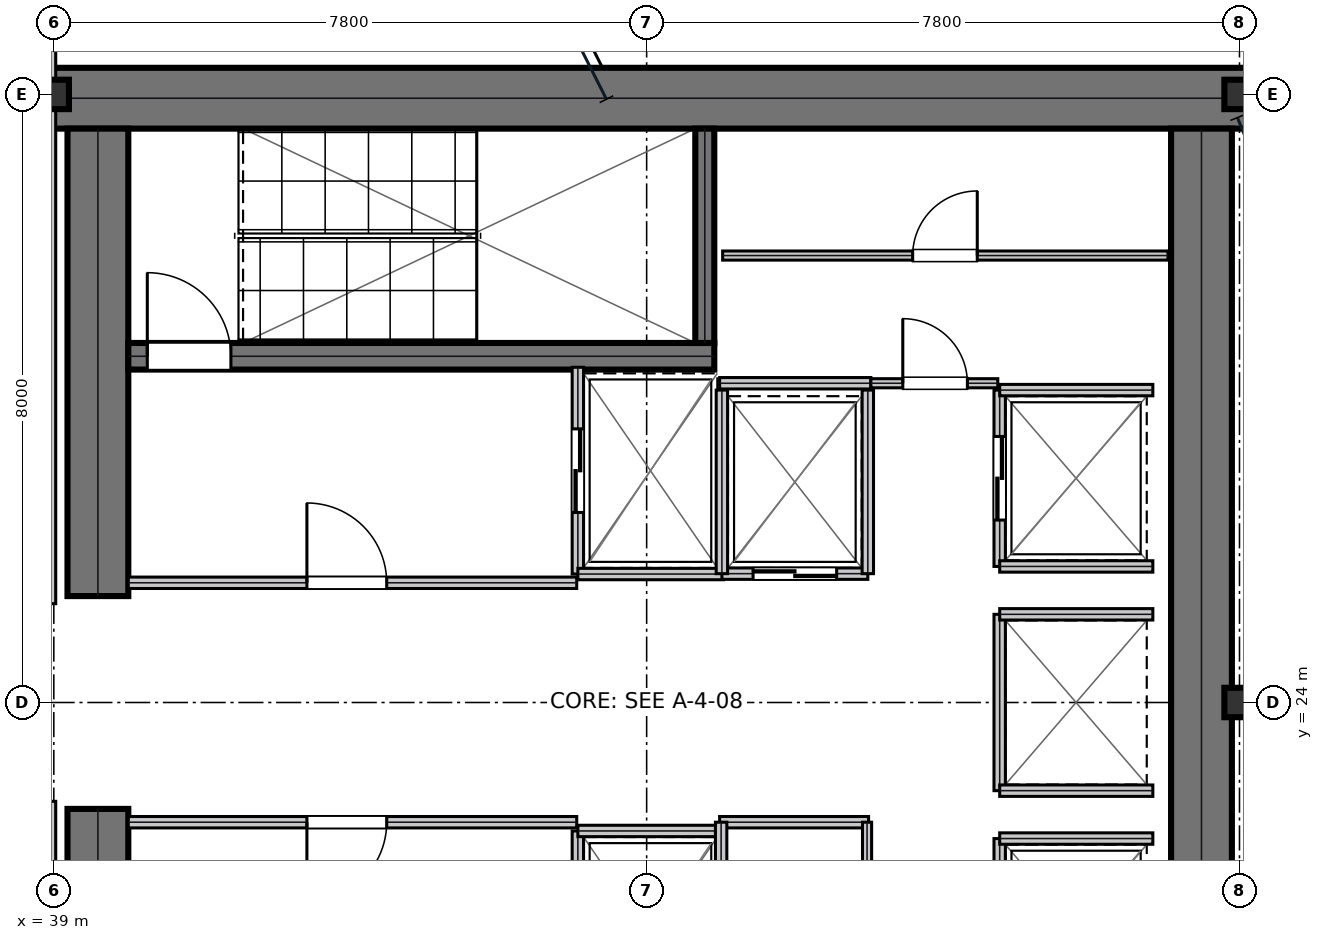
"""IFC4 building model, lengths in metres.
Left out: names, types, materials, properties, quantities, classifications, styles, units other than length and angle.
Written with IfcOpenShell. Run it as: python <this file> out.ifc"""

import sys

from ifc_helpers import new_model, si_unit, direction, frame, frame_2d, origin, origin_2d, place, context, subcontext, project, spatial, rectangle, i_section, extrude, element, fill, save


model = new_model("IFC4")
c1 = context("Model", 3, precision=1e-05, world=origin(), true_north=direction((0.0, 1.0)))
c2 = subcontext(c1, "Body", "Model", "MODEL_VIEW")
j1 = project(units=[si_unit("LENGTHUNIT", "METRE"), si_unit("PLANEANGLEUNIT", "RADIAN")], contexts=[c1])
p1 = place(None, origin())
s1 = spatial("IfcSite", under=j1, at=p1, CompositionType="ELEMENT")
p2 = place(p1, origin())
s2 = spatial("IfcBuilding", under=s1, at=p2, CompositionType="ELEMENT")
p3 = place(p2, frame((0.0, 0.0, 133.05)))
s3 = spatial("IfcBuildingStorey", under=s2, at=p3, CompositionType="ELEMENT", Elevation=133.05)
p4 = place(p3, frame((38.8, 31.95, 0.0), z_axis=(0.0, 0.0, 1.0), x_axis=(1.0, 0.0, 0.0)))
e1 = element("IfcWall", 1, at=p4, inside=s3, PredefinedType="SHEAR", context=c2, shape_type="SweptSolid", body=[
    extrude(rectangle(XDim=16.0, YDim=0.8, at=frame_2d((8.0, 0.0))), origin(), (0.0, 0.0, 1.0), 3.81),
])
for number, where, z_axis, x_axis in (
    (2, (39.58, 16.45, 0.0), (0.0, 0.0, 1.0), (0.0, 1.0, 0.0)),
    (3, (39.58, 25.4, 0.0), (0.0, 0.0, 1.0), (0.0, 1.0, 0.0)),
):
    element("IfcWall", number, at=place(p3, frame(where, z_axis=z_axis, x_axis=x_axis)), inside=s3, PredefinedType="SHEAR", context=c2, shape_type="SweptSolid", body=[
        extrude(rectangle(XDim=6.15, YDim=0.8, at=frame_2d((3.075, 0.0))), origin(), (0.0, 0.0, 1.0), 3.81),
    ])
p5 = place(p3, frame((54.1, 16.45, 0.0), z_axis=(0.0, 0.0, 1.0), x_axis=(0.0, 1.0, 0.0)))
e4 = element("IfcWall", 4, at=p5, inside=s3, PredefinedType="SHEAR", context=c2, shape_type="SweptSolid", body=[
    extrude(rectangle(XDim=15.1, YDim=0.8, at=frame_2d((7.55, 0.0))), origin(), (0.0, 0.0, 1.0), 3.81),
])
p6 = place(p3, frame((39.98, 28.555, 0.0), z_axis=(0.0, 0.0, 1.0), x_axis=(1.0, 0.0, 0.0)))
e5 = element("IfcWall", 5, at=p6, inside=s3, PredefinedType="SHEAR", context=c2, shape_type="SweptSolid", body=[
    extrude(rectangle(XDim=7.71, YDim=0.35, at=frame_2d((3.855, 0.0))), origin(), (0.0, 0.0, 1.0), 3.81),
])
p7 = place(p6, frame((0.25, 0.0, 0.0)))
e6 = element("IfcOpeningElement", 6, at=p7, cuts=e5, PredefinedType="OPENING", context=c2, shape_type="SweptSolid", body=[
    extrude(rectangle(XDim=1.1, YDim=2.15, at=frame_2d((0.55, 1.075))), frame((0.0, 0.185, 0.0), z_axis=(0.0, -1.0, 0.0), x_axis=(1.0, 0.0, 0.0)), (0.0, 0.0, 1.0), 0.37),
])
p8 = place(p3, frame((47.565, 28.73, 0.0), z_axis=(0.0, 0.0, 1.0), x_axis=(0.0, 1.0, 0.0)))
e7 = element("IfcWall", 7, at=p8, inside=s3, PredefinedType="SHEAR", context=c2, shape_type="SweptSolid", body=[
    extrude(rectangle(XDim=2.82, YDim=0.25, at=frame_2d((1.41, 0.0))), origin(), (0.0, 0.0, 1.0), 3.81),
])
for number, where, z_axis, x_axis in (
    (8, (39.0, 32.0, 0.0), (0.0, 0.0, 1.0), (1.0, 0.0, 0.0)),
    (9, (54.6, 24.0, 0.0), (0.0, 0.0, 1.0), (1.0, 0.0, 0.0)),
    (10, (54.6, 32.0, 0.0), (0.0, 0.0, 1.0), (1.0, 0.0, 0.0)),
):
    element("IfcColumn", number, at=place(p3, frame(where, z_axis=z_axis, x_axis=x_axis)), inside=s3, PredefinedType="COLUMN", context=c2, shape_type="SweptSolid", body=[
        extrude(i_section(OverallWidth=0.398, OverallDepth=0.387, WebThickness=0.021, FlangeThickness=0.033, at=origin_2d()), origin(), (0.0, 0.0, 1.0), 4.044),
    ])
p9 = place(p3, frame((39.98, 25.575, 0.0), z_axis=(0.0, 0.0, 1.0), x_axis=(1.0, 0.0, 0.0)))
e11 = element("IfcWall", 11, at=p9, inside=s3, PredefinedType="PARTITIONING", context=c2, shape_type="SweptSolid", body=[
    extrude(rectangle(XDim=5.9, YDim=0.15, at=frame_2d((2.95, 0.0))), origin(), (0.0, 0.0, 1.0), 3.81),
])
p10 = place(p9, frame((2.35, 0.0, 0.0)))
e12 = element("IfcOpeningElement", 12, at=p10, cuts=e11, PredefinedType="OPENING", context=c2, shape_type="SweptSolid", body=[
    extrude(rectangle(XDim=1.05, YDim=2.15, at=frame_2d((0.525, 1.075))), frame((0.0, 0.085, 0.0), z_axis=(0.0, -1.0, 0.0), x_axis=(1.0, 0.0, 0.0)), (0.0, 0.0, 1.0), 0.17),
])
p11 = place(p3, frame((39.98, 22.425, 0.0), z_axis=(0.0, 0.0, 1.0), x_axis=(1.0, 0.0, 0.0)))
e13 = element("IfcWall", 13, at=p11, inside=s3, PredefinedType="PARTITIONING", context=c2, shape_type="SweptSolid", body=[
    extrude(rectangle(XDim=5.9, YDim=0.15, at=frame_2d((2.95, 0.0))), origin(), (0.0, 0.0, 1.0), 3.81),
])
p12 = place(p11, frame((2.35, 0.0, 0.0)))
e14 = element("IfcOpeningElement", 14, at=p12, cuts=e13, PredefinedType="OPENING", context=c2, shape_type="SweptSolid", body=[
    extrude(rectangle(XDim=1.05, YDim=2.15, at=frame_2d((0.525, 1.075))), frame((0.0, 0.085, 0.0), z_axis=(0.0, -1.0, 0.0), x_axis=(1.0, 0.0, 0.0)), (0.0, 0.0, 1.0), 0.17),
])
p13 = place(p3, frame((45.895, 25.69, 0.0), z_axis=(0.0, 0.0, 1.0), x_axis=(0.0, 1.0, 0.0)))
e15 = element("IfcWall", 15, at=p13, inside=s3, PredefinedType="PARTITIONING", context=c2, shape_type="SweptSolid", body=[
    extrude(rectangle(XDim=2.72, YDim=0.15, at=frame_2d((1.36, 0.0))), origin(), (0.0, 0.0, 1.0), 3.81),
])
p14 = place(p13, frame((0.81, 0.0, 0.0)))
e16 = element("IfcOpeningElement", 16, at=p14, cuts=e15, PredefinedType="OPENING", context=c2, shape_type="SweptSolid", body=[
    extrude(rectangle(XDim=1.1, YDim=2.15, at=frame_2d((0.55, 1.075))), frame((0.0, 0.085, 0.0), z_axis=(0.0, -1.0, 0.0), x_axis=(1.0, 0.0, 0.0)), (0.0, 0.0, 1.0), 0.17),
])
p15 = place(p3, frame((45.895, 25.69, 0.0), z_axis=(0.0, 0.0, 1.0), x_axis=(1.0, 0.0, 0.0)))
e17 = element("IfcWall", 17, at=p15, inside=s3, PredefinedType="PARTITIONING", context=c2, shape_type="SweptSolid", body=[
    extrude(rectangle(XDim=1.915, YDim=0.15, at=frame_2d((0.958, 0.0))), origin(), (0.0, 0.0, 1.0), 3.81),
])
p16 = place(p3, frame((45.895, 19.59, 0.0), z_axis=(0.0, 0.0, 1.0), x_axis=(0.0, 1.0, 0.0)))
e18 = element("IfcWall", 18, at=p16, inside=s3, PredefinedType="PARTITIONING", context=c2, shape_type="SweptSolid", body=[
    extrude(rectangle(XDim=2.72, YDim=0.15, at=frame_2d((1.36, 0.0))), origin(), (0.0, 0.0, 1.0), 3.81),
])
p17 = place(p16, frame((0.81, 0.0, 0.0)))
e19 = element("IfcOpeningElement", 19, at=p17, cuts=e18, PredefinedType="OPENING", context=c2, shape_type="SweptSolid", body=[
    extrude(rectangle(XDim=1.1, YDim=2.15, at=frame_2d((0.55, 1.075))), frame((0.0, 0.085, 0.0), z_axis=(0.0, -1.0, 0.0), x_axis=(1.0, 0.0, 0.0)), (0.0, 0.0, 1.0), 0.17),
])
p18 = place(p3, frame((45.895, 22.31, 0.0), z_axis=(0.0, 0.0, 1.0), x_axis=(1.0, 0.0, 0.0)))
e20 = element("IfcWall", 20, at=p18, inside=s3, PredefinedType="PARTITIONING", context=c2, shape_type="SweptSolid", body=[
    extrude(rectangle(XDim=1.915, YDim=0.15, at=frame_2d((0.958, 0.0))), origin(), (0.0, 0.0, 1.0), 3.81),
])
p19 = place(p3, frame((47.79, 25.695, 0.0), z_axis=(0.0, 0.0, 1.0), x_axis=(1.0, 0.0, 0.0)))
e21 = element("IfcWall", 21, at=p19, inside=s3, PredefinedType="PARTITIONING", context=c2, shape_type="SweptSolid", body=[
    extrude(rectangle(XDim=1.92, YDim=0.15, at=frame_2d((0.96, 0.0))), origin(), (0.0, 0.0, 1.0), 3.81),
])
p20 = place(p19, frame((0.41, 0.0, 0.0)))
e22 = element("IfcOpeningElement", 22, at=p20, cuts=e21, PredefinedType="OPENING", context=c2, shape_type="SweptSolid", body=[
    extrude(rectangle(XDim=1.1, YDim=2.15, at=frame_2d((0.55, 1.075))), frame((0.0, 0.085, 0.0), z_axis=(0.0, -1.0, 0.0), x_axis=(1.0, 0.0, 0.0)), (0.0, 0.0, 1.0), 0.17),
])
for number, where, z_axis, x_axis in (
    (23, (47.79, 25.695, 0.0), (0.0, 0.0, 1.0), (0.0, 1.0, 0.0)),
    (24, (49.71, 25.695, 0.0), (0.0, 0.0, 1.0), (0.0, 1.0, 0.0)),
):
    element("IfcWall", number, at=place(p3, frame(where, z_axis=z_axis, x_axis=x_axis)), inside=s3, PredefinedType="PARTITIONING", context=c2, shape_type="SweptSolid", body=[
        extrude(rectangle(XDim=2.415, YDim=0.15, at=frame_2d((1.208, 0.0))), origin(), (0.0, 0.0, 1.0), 3.81),
    ])
p21 = place(p3, frame((51.445, 25.79, 0.0), z_axis=(0.0, 0.0, 1.0), x_axis=(0.0, 1.0, 0.0)))
e25 = element("IfcWall", 25, at=p21, inside=s3, PredefinedType="PARTITIONING", context=c2, shape_type="SweptSolid", body=[
    extrude(rectangle(XDim=2.32, YDim=0.15, at=frame_2d((1.16, 0.0))), origin(), (0.0, 0.0, 1.0), 3.81),
])
p22 = place(p21, frame((0.61, 0.0, 0.0)))
e26 = element("IfcOpeningElement", 26, at=p22, cuts=e25, PredefinedType="OPENING", context=c2, shape_type="SweptSolid", body=[
    extrude(rectangle(XDim=1.1, YDim=2.15, at=frame_2d((0.55, 1.075))), frame((0.0, 0.085, 0.0), z_axis=(0.0, -1.0, 0.0), x_axis=(1.0, 0.0, 0.0)), (0.0, 0.0, 1.0), 0.17),
])
for number, where, z_axis, x_axis in (
    (27, (51.445, 25.79, 0.0), (0.0, 0.0, 1.0), (1.0, 0.0, 0.0)),
    (28, (51.445, 28.11, 0.0), (0.0, 0.0, 1.0), (1.0, 0.0, 0.0)),
):
    element("IfcWall", number, at=place(p3, frame(where, z_axis=z_axis, x_axis=x_axis)), inside=s3, PredefinedType="PARTITIONING", context=c2, shape_type="SweptSolid", body=[
        extrude(rectangle(XDim=2.015, YDim=0.15, at=frame_2d((1.007, 0.0))), origin(), (0.0, 0.0, 1.0), 3.81),
    ])
p23 = place(p3, frame((51.445, 19.89, 0.0), z_axis=(0.0, 0.0, 1.0), x_axis=(0.0, 1.0, 0.0)))
e29 = element("IfcWall", 29, at=p23, inside=s3, PredefinedType="PARTITIONING", context=c2, shape_type="SweptSolid", body=[
    extrude(rectangle(XDim=2.32, YDim=0.15, at=frame_2d((1.16, 0.0))), origin(), (0.0, 0.0, 1.0), 3.81),
])
p24 = place(p23, frame((0.61, 0.0, 0.0)))
e30 = element("IfcOpeningElement", 30, at=p24, cuts=e29, PredefinedType="OPENING", context=c2, shape_type="SweptSolid", body=[
    extrude(rectangle(XDim=1.1, YDim=2.15, at=frame_2d((0.55, 1.075))), frame((0.0, 0.085, 0.0), z_axis=(0.0, -1.0, 0.0), x_axis=(1.0, 0.0, 0.0)), (0.0, 0.0, 1.0), 0.17),
])
p25 = place(p3, frame((51.445, 22.21, 0.0), z_axis=(0.0, 0.0, 1.0), x_axis=(1.0, 0.0, 0.0)))
e31 = element("IfcWall", 31, at=p25, inside=s3, PredefinedType="PARTITIONING", context=c2, shape_type="SweptSolid", body=[
    extrude(rectangle(XDim=2.015, YDim=0.15, at=frame_2d((1.007, 0.0))), origin(), (0.0, 0.0, 1.0), 3.81),
])
p26 = place(p3, frame((51.445, 22.84, 0.0), z_axis=(0.0, 0.0, 1.0), x_axis=(0.0, 1.0, 0.0)))
e32 = element("IfcWall", 32, at=p26, inside=s3, PredefinedType="PARTITIONING", context=c2, shape_type="SweptSolid", body=[
    extrude(rectangle(XDim=2.32, YDim=0.15, at=frame_2d((1.16, 0.0))), origin(), (0.0, 0.0, 1.0), 3.81),
])
for number, where, z_axis, x_axis in (
    (33, (51.445, 22.84, 0.0), (0.0, 0.0, 1.0), (1.0, 0.0, 0.0)),
    (34, (51.445, 25.16, 0.0), (0.0, 0.0, 1.0), (1.0, 0.0, 0.0)),
):
    element("IfcWall", number, at=place(p3, frame(where, z_axis=z_axis, x_axis=x_axis)), inside=s3, PredefinedType="PARTITIONING", context=c2, shape_type="SweptSolid", body=[
        extrude(rectangle(XDim=2.015, YDim=0.15, at=frame_2d((1.007, 0.0))), origin(), (0.0, 0.0, 1.0), 3.81),
    ])
p27 = place(p3, frame((47.76, 22.425, 0.0), z_axis=(0.0, 0.0, 1.0), x_axis=(1.0, 0.0, 0.0)))
e35 = element("IfcWall", 35, at=p27, inside=s3, PredefinedType="PARTITIONING", context=c2, shape_type="SweptSolid", body=[
    extrude(rectangle(XDim=1.96, YDim=0.15, at=frame_2d((0.98, 0.0))), origin(), (0.0, 0.0, 1.0), 3.81),
])
p28 = place(p3, frame((47.78, 16.45, 0.0), z_axis=(0.0, 0.0, 1.0), x_axis=(0.0, 1.0, 0.0)))
e36 = element("IfcWall", 36, at=p28, inside=s3, PredefinedType="PARTITIONING", context=c2, shape_type="SweptSolid", body=[
    extrude(rectangle(XDim=5.975, YDim=0.15, at=frame_2d((2.988, 0.0))), origin(), (0.0, 0.0, 1.0), 3.81),
])
p29 = place(p3, frame((49.7, 16.48, 0.0), z_axis=(0.0, 0.0, 1.0), x_axis=(0.0, 1.0, 0.0)))
e37 = element("IfcWall", 37, at=p29, inside=s3, PredefinedType="PARTITIONING", context=c2, shape_type="SweptSolid", body=[
    extrude(rectangle(XDim=5.945, YDim=0.12, at=frame_2d((2.973, 0.0))), origin(), (0.0, 0.0, 1.0), 3.81),
])
p30 = place(p29, frame((3.35, 0.0, 0.0)))
e38 = element("IfcOpeningElement", 38, at=p30, cuts=e37, PredefinedType="OPENING", context=c2, shape_type="SweptSolid", body=[
    extrude(rectangle(XDim=0.95, YDim=2.15, at=frame_2d((0.475, 1.075))), frame((0.0, 0.07, 0.0), z_axis=(0.0, -1.0, 0.0), x_axis=(1.0, 0.0, 0.0)), (0.0, 0.0, 1.0), 0.14),
])
p31 = place(p3, frame((47.76, 28.2, 0.0), z_axis=(0.0, 0.0, 1.0), x_axis=(1.0, 0.0, 0.0)))
e39 = element("IfcWall", 39, at=p31, inside=s3, PredefinedType="PARTITIONING", context=c2, shape_type="SweptSolid", body=[
    extrude(rectangle(XDim=1.99, YDim=0.15, at=frame_2d((0.995, 0.0))), origin(), (0.0, 0.0, 1.0), 3.81),
])
p32 = place(p3, frame((49.75, 28.2, 0.0), z_axis=(0.0, 0.0, 1.0), x_axis=(1.0, 0.0, 0.0)))
e40 = element("IfcWall", 40, at=p32, inside=s3, PredefinedType="PARTITIONING", context=c2, shape_type="SweptSolid", body=[
    extrude(rectangle(XDim=1.67, YDim=0.12, at=frame_2d((0.835, 0.0))), origin(), (0.0, 0.0, 1.0), 3.81),
])
p33 = place(p32, frame((0.42, 0.0, 0.0)))
e41 = element("IfcOpeningElement", 41, at=p33, cuts=e40, PredefinedType="OPENING", context=c2, shape_type="SweptSolid", body=[
    extrude(rectangle(XDim=0.85, YDim=2.15, at=frame_2d((0.425, 1.075))), frame((0.0, 0.07, 0.0), z_axis=(0.0, -1.0, 0.0), x_axis=(1.0, 0.0, 0.0)), (0.0, 0.0, 1.0), 0.14),
])
p34 = place(p3, frame((47.8, 29.88, 0.0), z_axis=(0.0, 0.0, 1.0), x_axis=(1.0, 0.0, 0.0)))
e42 = element("IfcWall", 42, at=p34, inside=s3, PredefinedType="PARTITIONING", context=c2, shape_type="SweptSolid", body=[
    extrude(rectangle(XDim=5.86, YDim=0.12, at=frame_2d((2.93, 0.0))), origin(), (0.0, 0.0, 1.0), 3.81),
])
p35 = place(p34, frame((2.5, 0.0, 0.0)))
e43 = element("IfcOpeningElement", 43, at=p35, cuts=e42, PredefinedType="OPENING", context=c2, shape_type="SweptSolid", body=[
    extrude(rectangle(XDim=0.85, YDim=2.15, at=frame_2d((0.425, 1.075))), frame((0.0, 0.07, 0.0), z_axis=(0.0, -1.0, 0.0), x_axis=(1.0, 0.0, 0.0)), (0.0, 0.0, 1.0), 0.14),
])
for number, where, z_axis, x_axis in (
    (44, (38.95, 14.5, 0.0), (0.0, 0.0, 1.0), (0.0, 1.0, 0.0)),
    (45, (38.95, 25.3, 0.0), (0.0, 0.0, 1.0), (0.0, 1.0, 0.0)),
):
    element("IfcWall", number, at=place(p3, frame(where, z_axis=z_axis, x_axis=x_axis)), inside=s3, PredefinedType="PARTITIONING", context=c2, shape_type="SweptSolid", body=[
        extrude(rectangle(XDim=8.2, YDim=0.15, at=frame_2d((4.1, 0.0))), origin(), (0.0, 0.0, 1.0), 3.19),
    ])
p36 = place(p10, origin())
e46 = element("IfcDoor", 46, at=p36, inside=s3, OperationType="SINGLE_SWING_LEFT", PredefinedType="DOOR", context=c2, shape_type="SweptSolid", body=[
    extrude(rectangle(XDim=1.05, YDim=2.15, at=frame_2d((0.525, 1.075))), frame((0.0, 0.025, 0.0), z_axis=(0.0, -1.0, 0.0), x_axis=(1.0, 0.0, 0.0)), (0.0, 0.0, 1.0), 0.05),
])
fill(e12, e46)
p37 = place(p12, frame((1.05, 0.0, 0.0), z_axis=(0.0, 0.0, 1.0), x_axis=(-1.0, 0.0, 0.0)))
e47 = element("IfcDoor", 47, at=p37, inside=s3, OperationType="SINGLE_SWING_RIGHT", PredefinedType="DOOR", context=c2, shape_type="SweptSolid", body=[
    extrude(rectangle(XDim=1.05, YDim=2.15, at=frame_2d((0.525, 1.075))), frame((0.0, 0.025, 0.0), z_axis=(0.0, -1.0, 0.0), x_axis=(1.0, 0.0, 0.0)), (0.0, 0.0, 1.0), 0.05),
])
fill(e14, e47)
p38 = place(p14, frame((1.1, 0.0, 0.0), z_axis=(0.0, 0.0, 1.0), x_axis=(-1.0, 0.0, 0.0)))
e48 = element("IfcDoor", 48, at=p38, inside=s3, OperationType="DOUBLE_DOOR_SLIDING", PredefinedType="DOOR", context=c2, shape_type="SweptSolid", body=[
    extrude(rectangle(XDim=1.1, YDim=2.15, at=frame_2d((0.55, 1.075))), frame((0.0, 0.025, 0.0), z_axis=(0.0, -1.0, 0.0), x_axis=(1.0, 0.0, 0.0)), (0.0, 0.0, 1.0), 0.05),
])
fill(e16, e48)
p39 = place(p20, frame((1.1, 0.0, 0.0), z_axis=(0.0, 0.0, 1.0), x_axis=(-1.0, 0.0, 0.0)))
e49 = element("IfcDoor", 49, at=p39, inside=s3, OperationType="DOUBLE_DOOR_SLIDING", PredefinedType="DOOR", context=c2, shape_type="SweptSolid", body=[
    extrude(rectangle(XDim=1.1, YDim=2.15, at=frame_2d((0.55, 1.075))), frame((0.0, 0.025, 0.0), z_axis=(0.0, -1.0, 0.0), x_axis=(1.0, 0.0, 0.0)), (0.0, 0.0, 1.0), 0.05),
])
fill(e22, e49)
p40 = place(p22, frame((1.1, 0.0, 0.0), z_axis=(0.0, 0.0, 1.0), x_axis=(-1.0, 0.0, 0.0)))
e50 = element("IfcDoor", 50, at=p40, inside=s3, OperationType="DOUBLE_DOOR_SLIDING", PredefinedType="DOOR", context=c2, shape_type="SweptSolid", body=[
    extrude(rectangle(XDim=1.1, YDim=2.15, at=frame_2d((0.55, 1.075))), frame((0.0, 0.025, 0.0), z_axis=(0.0, -1.0, 0.0), x_axis=(1.0, 0.0, 0.0)), (0.0, 0.0, 1.0), 0.05),
])
fill(e26, e50)
p41 = place(p33, origin())
e51 = element("IfcDoor", 51, at=p41, inside=s3, OperationType="SINGLE_SWING_LEFT", PredefinedType="DOOR", context=c2, shape_type="SweptSolid", body=[
    extrude(rectangle(XDim=0.85, YDim=2.15, at=frame_2d((0.425, 1.075))), frame((0.0, 0.025, 0.0), z_axis=(0.0, -1.0, 0.0), x_axis=(1.0, 0.0, 0.0)), (0.0, 0.0, 1.0), 0.05),
])
fill(e41, e51)
p42 = place(p35, origin())
e52 = element("IfcDoor", 52, at=p42, inside=s3, OperationType="SINGLE_SWING_RIGHT", PredefinedType="DOOR", context=c2, shape_type="SweptSolid", body=[
    extrude(rectangle(XDim=0.85, YDim=2.15, at=frame_2d((0.425, 1.075))), frame((0.0, 0.025, 0.0), z_axis=(0.0, -1.0, 0.0), x_axis=(1.0, 0.0, 0.0)), (0.0, 0.0, 1.0), 0.05),
])
fill(e43, e52)
p43 = place(p7, origin())
e53 = element("IfcDoor", 53, at=p43, inside=s3, OperationType="SINGLE_SWING_LEFT", PredefinedType="DOOR", context=c2, shape_type="SweptSolid", body=[
    extrude(rectangle(XDim=1.1, YDim=2.15, at=frame_2d((0.55, 1.075))), frame((0.0, 0.025, 0.0), z_axis=(0.0, -1.0, 0.0), x_axis=(1.0, 0.0, 0.0)), (0.0, 0.0, 1.0), 0.05),
])
fill(e6, e53)
save(model, sys.argv[1])
